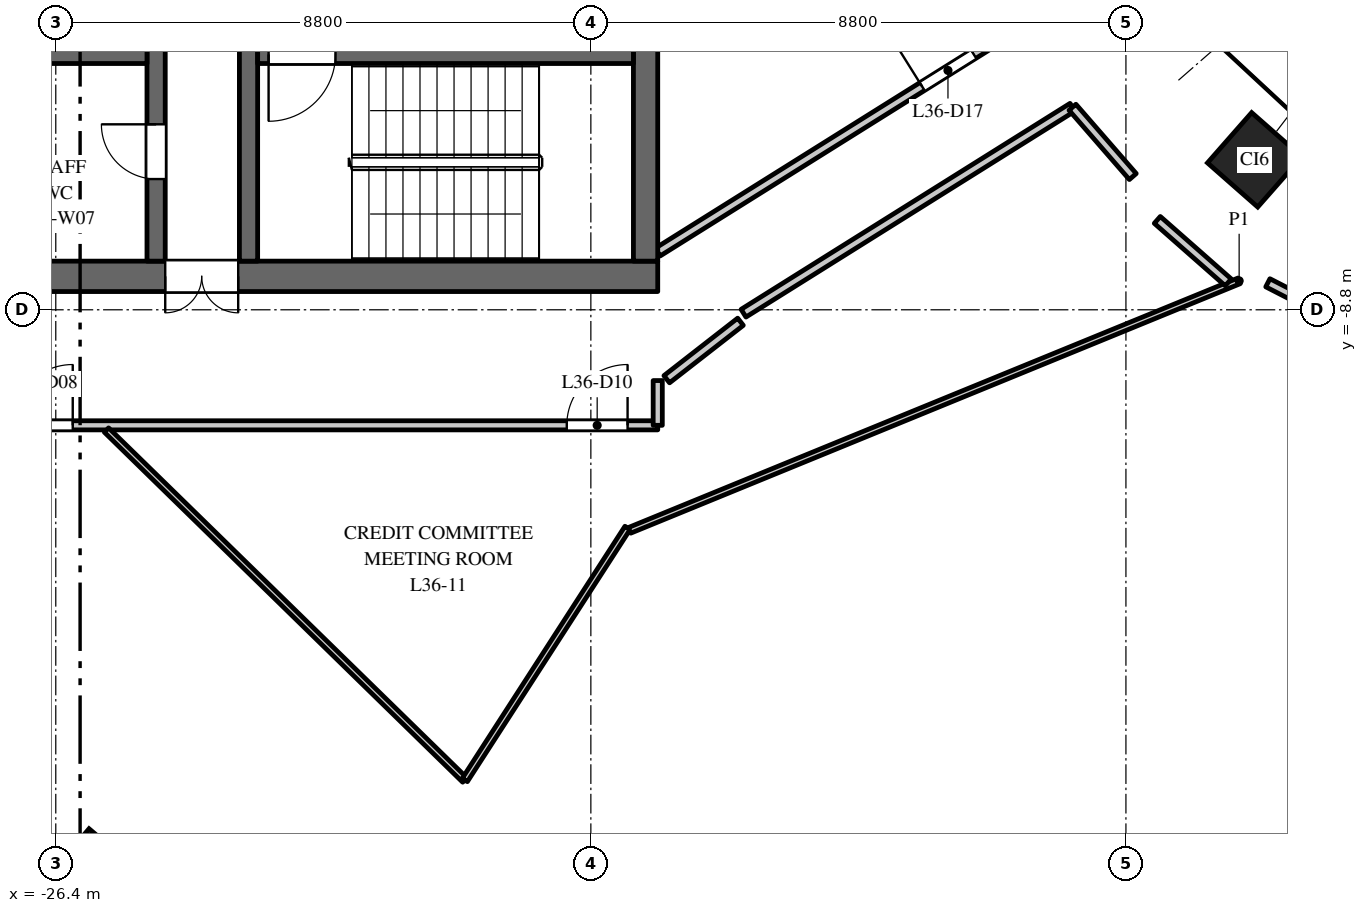
"""IFC4 building model, lengths in metres.
Left out: names, types, materials, properties, quantities, classifications, styles, units other than length and angle.
Written with IfcOpenShell. Run it as: python <this file> out.ifc"""

import sys

from ifc_helpers import new_model, si_unit, direction, frame, frame_2d, origin, origin_2d, place, context, subcontext, project, spatial, rectangle, extrude, element, fill, save


model = new_model("IFC4")
c1 = context("Model", 3, precision=1e-05, world=origin(), true_north=direction((0.0, 1.0)))
c2 = subcontext(c1, "Body", "Model", "MODEL_VIEW")
j1 = project(units=[si_unit("LENGTHUNIT", "METRE"), si_unit("PLANEANGLEUNIT", "RADIAN")], contexts=[c1])
p1 = place(None, origin())
s1 = spatial("IfcSite", under=j1, at=p1, CompositionType="ELEMENT")
p2 = place(p1, origin())
s2 = spatial("IfcBuilding", under=s1, at=p2, CompositionType="ELEMENT")
p3 = place(p2, frame((0.0, 0.0, 158.0)))
s3 = spatial("IfcBuildingStorey", under=s2, at=p3, CompositionType="ELEMENT", Elevation=158.0)
p4 = place(p3, frame((-25.783, -18.18, 0.0), z_axis=(0.0, 0.0, 1.0), x_axis=(0.763035199656, -0.646356932419, 0.0)))
e1 = element("IfcColumn", 1, at=p4, inside=s3, PredefinedType="COLUMN", context=c2, shape_type="SweptSolid", body=[
    extrude(rectangle(XDim=1.2, YDim=1.2, at=origin_2d()), origin(), (0.0, 0.0, 1.0), 4.0),
])
p5 = place(p3, frame((-6.682, -6.334, 0.0), z_axis=(0.0, 0.0, 1.0), x_axis=(0.75102249095, -0.660276622399, 0.0)))
e2 = element("IfcColumn", 2, at=p5, inside=s3, PredefinedType="COLUMN", context=c2, shape_type="SweptSolid", body=[
    extrude(rectangle(XDim=1.1, YDim=1.1, at=origin_2d()), origin(), (0.0, 0.0, 1.0), 4.0),
])
p6 = place(p3, frame((-16.5, -8.25, 0.0), z_axis=(0.0, 0.0, 1.0), x_axis=(-1.0, 0.0, 0.0)))
e3 = element("IfcWall", 3, at=p6, inside=s3, PredefinedType="SHEAR", context=c2, shape_type="SweptSolid", body=[
    extrude(rectangle(XDim=15.0, YDim=0.5, at=frame_2d((7.5, 0.0))), origin(), (0.0, 0.0, 1.0), 3.7),
])
p7 = place(p6, frame((6.9, 0.0, 0.0)))
e4 = element("IfcOpeningElement", 4, at=p7, cuts=e3, PredefinedType="OPENING", context=c2, shape_type="SweptSolid", body=[
    extrude(rectangle(XDim=1.2, YDim=2.1, at=frame_2d((0.6, 1.05))), frame((0.0, 0.26, 0.0), z_axis=(0.0, -1.0, 0.0), x_axis=(1.0, 0.0, 0.0)), (0.0, 0.0, 1.0), 0.52),
])
p8 = place(p6, frame((12.425, 0.0, 0.0)))
e5 = element("IfcOpeningElement", 5, at=p8, cuts=e3, PredefinedType="OPENING", context=c2, shape_type="SweptSolid", body=[
    extrude(rectangle(XDim=0.9, YDim=2.1, at=frame_2d((0.45, 1.05))), frame((0.0, 0.26, 0.0), z_axis=(0.0, -1.0, 0.0), x_axis=(1.0, 0.0, 0.0)), (0.0, 0.0, 1.0), 0.52),
])
p9 = place(p3, frame((-24.75, -8.0, 0.0), z_axis=(0.0, 0.0, 1.0), x_axis=(0.0, 1.0, 0.0)))
e6 = element("IfcWall", 6, at=p9, inside=s3, PredefinedType="SHEAR", context=c2, shape_type="SweptSolid", body=[
    extrude(rectangle(XDim=16.0, YDim=0.3, at=frame_2d((8.0, 0.0))), origin(), (0.0, 0.0, 1.0), 3.7),
])
p10 = place(p9, frame((4.425, 0.0, 0.0)))
e7 = element("IfcOpeningElement", 7, at=p10, cuts=e6, PredefinedType="OPENING", context=c2, shape_type="SweptSolid", body=[
    extrude(rectangle(XDim=1.1, YDim=2.1, at=frame_2d((0.55, 1.05))), frame((0.0, 0.16, 0.0), z_axis=(0.0, -1.0, 0.0), x_axis=(1.0, 0.0, 0.0)), (0.0, 0.0, 1.0), 0.32),
])
p11 = place(p9, frame((7.45, 0.0, 0.0)))
e8 = element("IfcOpeningElement", 8, at=p11, cuts=e6, PredefinedType="OPENING", context=c2, shape_type="SweptSolid", body=[
    extrude(rectangle(XDim=1.1, YDim=2.1, at=frame_2d((0.55, 1.05))), frame((0.0, 0.16, 0.0), z_axis=(0.0, -1.0, 0.0), x_axis=(1.0, 0.0, 0.0)), (0.0, 0.0, 1.0), 0.32),
])
p12 = place(p9, frame((10.475, 0.0, 0.0)))
e9 = element("IfcOpeningElement", 9, at=p12, cuts=e6, PredefinedType="OPENING", context=c2, shape_type="SweptSolid", body=[
    extrude(rectangle(XDim=1.1, YDim=2.1, at=frame_2d((0.55, 1.05))), frame((0.0, 0.16, 0.0), z_axis=(0.0, -1.0, 0.0), x_axis=(1.0, 0.0, 0.0)), (0.0, 0.0, 1.0), 0.32),
])
p13 = place(p9, frame((13.125, 0.0, 0.0)))
e10 = element("IfcOpeningElement", 10, at=p13, cuts=e6, PredefinedType="OPENING", context=c2, shape_type="SweptSolid", body=[
    extrude(rectangle(XDim=0.9, YDim=2.1, at=frame_2d((0.45, 1.05))), frame((0.0, 0.16, 0.0), z_axis=(0.0, -1.0, 0.0), x_axis=(1.0, 0.0, 0.0)), (0.0, 0.0, 1.0), 0.32),
])
p14 = place(p9, frame((14.75, 0.0, 0.0)))
e11 = element("IfcOpeningElement", 11, at=p14, cuts=e6, PredefinedType="OPENING", context=c2, shape_type="SweptSolid", body=[
    extrude(rectangle(XDim=0.9, YDim=2.1, at=frame_2d((0.45, 1.05))), frame((0.0, 0.16, 0.0), z_axis=(0.0, -1.0, 0.0), x_axis=(1.0, 0.0, 0.0)), (0.0, 0.0, 1.0), 0.32),
])
p15 = place(p9, frame((1.35, 0.0, 0.0)))
e12 = element("IfcOpeningElement", 12, at=p15, cuts=e6, PredefinedType="OPENING", context=c2, shape_type="SweptSolid", body=[
    extrude(rectangle(XDim=0.9, YDim=2.1, at=frame_2d((0.45, 1.05))), frame((0.0, 0.16, 0.0), z_axis=(0.0, -1.0, 0.0), x_axis=(1.0, 0.0, 0.0)), (0.0, 0.0, 1.0), 0.32),
])
p16 = place(p3, frame((-16.7, -8.0, 0.0), z_axis=(0.0, 0.0, 1.0), x_axis=(0.0, 1.0, 0.0)))
e13 = element("IfcWall", 13, at=p16, inside=s3, PredefinedType="SHEAR", context=c2, shape_type="SweptSolid", body=[
    extrude(rectangle(XDim=16.0, YDim=0.4, at=frame_2d((8.0, 0.0))), origin(), (0.0, 0.0, 1.0), 3.7),
])
p17 = place(p3, frame((-24.9, -4.6, 0.0), z_axis=(0.0, 0.0, 1.0), x_axis=(-1.0, 0.0, 0.0)))
e14 = element("IfcWall", 14, at=p17, inside=s3, PredefinedType="SHEAR", context=c2, shape_type="SweptSolid", body=[
    extrude(rectangle(XDim=6.1, YDim=0.3, at=frame_2d((3.05, 0.0))), origin(), (0.0, 0.0, 1.0), 3.7),
])
p18 = place(p3, frame((-23.23, -8.0, 0.0), z_axis=(0.0, 0.0, 1.0), x_axis=(0.0, 1.0, 0.0)))
e15 = element("IfcWall", 15, at=p18, inside=s3, PredefinedType="SHEAR", context=c2, shape_type="SweptSolid", body=[
    extrude(rectangle(XDim=7.875, YDim=0.3, at=frame_2d((3.938, 0.0))), origin(), (0.0, 0.0, 1.0), 3.7),
])
p19 = place(p18, frame((5.15, 0.0, 0.0)))
e16 = element("IfcOpeningElement", 16, at=p19, cuts=e15, PredefinedType="OPENING", context=c2, shape_type="SweptSolid", body=[
    extrude(rectangle(XDim=1.1, YDim=2.1, at=frame_2d((0.55, 1.05))), frame((0.0, 0.16, 0.0), z_axis=(0.0, -1.0, 0.0), x_axis=(1.0, 0.0, 0.0)), (0.0, 0.0, 1.0), 0.32),
])
p20 = place(p3, frame((-16.9, -4.6, 0.0), z_axis=(0.0, 0.0, 1.0), x_axis=(-1.0, 0.0, 0.0)))
e17 = element("IfcWall", 17, at=p20, inside=s3, PredefinedType="SHEAR", context=c2, shape_type="SweptSolid", body=[
    extrude(rectangle(XDim=6.18, YDim=0.3, at=frame_2d((3.09, 0.0))), origin(), (0.0, 0.0, 1.0), 3.7),
])
p21 = place(p20, frame((4.9, 0.0, 0.0)))
e18 = element("IfcOpeningElement", 18, at=p21, cuts=e17, PredefinedType="OPENING", context=c2, shape_type="SweptSolid", body=[
    extrude(rectangle(XDim=1.1, YDim=2.1, at=frame_2d((0.55, 1.05))), frame((0.0, 0.16, 0.0), z_axis=(0.0, -1.0, 0.0), x_axis=(1.0, 0.0, 0.0)), (0.0, 0.0, 1.0), 0.32),
])
p22 = place(p3, frame((-31.5, -10.7, 0.0), z_axis=(0.0, 0.0, 1.0), x_axis=(1.0, 0.0, 0.0)))
e19 = element("IfcWall", 19, at=p22, inside=s3, PredefinedType="PARTITIONING", context=c2, shape_type="SweptSolid", body=[
    extrude(rectangle(XDim=15.0, YDim=0.15, at=frame_2d((7.5, 0.0))), origin(), (0.0, 0.0, 1.0), 3.1),
])
p23 = place(p22, frame((4.379, 0.0, 0.0)))
e20 = element("IfcOpeningElement", 20, at=p23, cuts=e19, PredefinedType="OPENING", context=c2, shape_type="SweptSolid", body=[
    extrude(rectangle(XDim=1.0, YDim=2.1, at=frame_2d((0.5, 1.05))), frame((0.0, 0.085, 0.0), z_axis=(0.0, -1.0, 0.0), x_axis=(1.0, 0.0, 0.0)), (0.0, 0.0, 1.0), 0.17),
])
p24 = place(p22, frame((13.504, 0.0, 0.0)))
e21 = element("IfcOpeningElement", 21, at=p24, cuts=e19, PredefinedType="OPENING", context=c2, shape_type="SweptSolid", body=[
    extrude(rectangle(XDim=1.0, YDim=2.1, at=frame_2d((0.5, 1.05))), frame((0.0, 0.085, 0.0), z_axis=(0.0, -1.0, 0.0), x_axis=(1.0, 0.0, 0.0)), (0.0, 0.0, 1.0), 0.17),
])
p25 = place(p3, frame((-25.566, -10.778, 0.0), z_axis=(0.0, 0.0, 1.0), x_axis=(0.715430617602, -0.698683784982, 0.0)))
e22 = element("IfcWall", 22, at=p25, inside=s3, PredefinedType="PARTITIONING", context=c2, shape_type="SweptSolid", body=[
    extrude(rectangle(XDim=8.237, YDim=0.1, at=frame_2d((4.118, 0.0))), origin(), (0.0, 0.0, 1.0), 2.75),
])
p26 = place(p3, frame((-19.673, -16.533, 0.0), z_axis=(0.0, 0.0, 1.0), x_axis=(0.542297022656, 0.840186847801, 0.0)))
e23 = element("IfcWall", 23, at=p26, inside=s3, PredefinedType="PARTITIONING", context=c2, shape_type="SweptSolid", body=[
    extrude(rectangle(XDim=4.935, YDim=0.1, at=frame_2d((2.467, 0.0))), origin(), (0.0, 0.0, 1.0), 3.7),
])
p27 = place(p3, frame((-16.963, -12.427, 0.0), z_axis=(0.0, 0.0, 1.0), x_axis=(0.925484473487, 0.378785545308, 0.0)))
e24 = element("IfcWall", 24, at=p27, inside=s3, PredefinedType="PARTITIONING", context=c2, shape_type="SweptSolid", body=[
    extrude(rectangle(XDim=10.832, YDim=0.1, at=frame_2d((5.416, 0.0))), origin(), (0.0, 0.0, 1.0), 3.7),
])
p28 = place(p3, frame((-16.5, -10.7, 0.0), z_axis=(0.0, 0.0, 1.0), x_axis=(0.0, 1.0, 0.0)))
e25 = element("IfcWall", 25, at=p28, inside=s3, PredefinedType="PARTITIONING", context=c2, shape_type="SweptSolid", body=[
    extrude(rectangle(XDim=0.736, YDim=0.15, at=frame_2d((0.368, 0.0))), origin(), (0.0, 0.0, 1.0), 3.7),
])
p29 = place(p3, frame((-16.5, -7.851, 0.0), z_axis=(0.0, 0.0, 1.0), x_axis=(0.847690706888, 0.530490777917, 0.0)))
e26 = element("IfcWall", 26, at=p29, inside=s3, PredefinedType="PARTITIONING", context=c2, shape_type="SweptSolid", body=[
    extrude(rectangle(XDim=6.781, YDim=0.15, at=frame_2d((3.39, 0.0))), origin(), (0.0, 0.0, 1.0), 3.7),
])
p30 = place(p29, frame((5.131, 0.0, 0.0)))
e27 = element("IfcOpeningElement", 27, at=p30, cuts=e26, PredefinedType="OPENING", context=c2, shape_type="SweptSolid", body=[
    extrude(rectangle(XDim=1.0, YDim=2.1, at=frame_2d((0.5, 1.05))), frame((0.0, 0.085, 0.0), z_axis=(0.0, -1.0, 0.0), x_axis=(1.0, 0.0, 0.0)), (0.0, 0.0, 1.0), 0.17),
])
p31 = place(p3, frame((-15.089, -8.856, 0.0), z_axis=(0.0, 0.0, 1.0), x_axis=(0.847602682855, 0.530631408811, 0.0)))
e28 = element("IfcWall", 28, at=p31, inside=s3, PredefinedType="PARTITIONING", context=c2, shape_type="SweptSolid", body=[
    extrude(rectangle(XDim=6.383, YDim=0.15, at=frame_2d((3.191, 0.0))), origin(), (0.0, 0.0, 1.0), 3.7),
])
p32 = place(p3, frame((-9.679, -5.469, 0.0), z_axis=(0.0, 0.0, 1.0), x_axis=(0.656454677423, -0.75436546613, 0.0)))
e29 = element("IfcWall", 29, at=p32, inside=s3, PredefinedType="PARTITIONING", context=c2, shape_type="SweptSolid", body=[
    extrude(rectangle(XDim=1.511, YDim=0.15, at=frame_2d((0.755, 0.0))), origin(), (0.0, 0.0, 1.0), 2.75),
])
p33 = place(p3, frame((-8.284, -7.322, 0.0), z_axis=(0.0, 0.0, 1.0), x_axis=(0.750666784408, -0.660680996235, 0.0)))
e30 = element("IfcWall", 30, at=p33, inside=s3, PredefinedType="PARTITIONING", context=c2, shape_type="SweptSolid", body=[
    extrude(rectangle(XDim=1.555, YDim=0.15, at=frame_2d((0.777, 0.0))), origin(), (0.0, 0.0, 1.0), 3.7),
])
p34 = place(p3, frame((-6.466, -8.356, 0.0), z_axis=(0.0, 0.0, 1.0), x_axis=(0.889472002788, -0.456989667559, 0.0)))
e31 = element("IfcWall", 31, at=p34, inside=s3, PredefinedType="PARTITIONING", context=c2, shape_type="SweptSolid", body=[
    extrude(rectangle(XDim=1.355, YDim=0.15, at=frame_2d((0.677, 0.0))), origin(), (0.0, 0.0, 1.0), 3.7),
])
p35 = place(p3, frame((-15.139, -8.997, 0.0), z_axis=(0.0, 0.0, 1.0), x_axis=(-0.788950226826, -0.614457109643, 0.0)))
e32 = element("IfcWall", 32, at=p35, inside=s3, PredefinedType="PARTITIONING", context=c2, shape_type="SweptSolid", body=[
    extrude(rectangle(XDim=1.538, YDim=0.15, at=frame_2d((0.769, 0.0))), origin(), (0.0, 0.0, 1.0), 3.7),
])
p36 = place(p21, origin())
e33 = element("IfcDoor", 33, at=p36, inside=s3, OperationType="SINGLE_SWING_LEFT", PredefinedType="DOOR", context=c2, shape_type="SweptSolid", body=[
    extrude(rectangle(XDim=1.1, YDim=2.1, at=frame_2d((0.55, 1.05))), frame((0.0, 0.025, 0.0), z_axis=(0.0, -1.0, 0.0), x_axis=(1.0, 0.0, 0.0)), (0.0, 0.0, 1.0), 0.05),
])
fill(e18, e33)
p37 = place(p7, origin())
e34 = element("IfcDoor", 34, at=p37, inside=s3, OperationType="DOUBLE_DOOR_DOUBLE_SWING", PredefinedType="DOOR", context=c2, shape_type="SweptSolid", body=[
    extrude(rectangle(XDim=1.2, YDim=2.1, at=frame_2d((0.6, 1.05))), frame((0.0, 0.025, 0.0), z_axis=(0.0, -1.0, 0.0), x_axis=(1.0, 0.0, 0.0)), (0.0, 0.0, 1.0), 0.05),
])
fill(e4, e34)
p38 = place(p15, origin())
e35 = element("IfcDoor", 35, at=p38, inside=s3, OperationType="SINGLE_SWING_LEFT", PredefinedType="DOOR", context=c2, shape_type="SweptSolid", body=[
    extrude(rectangle(XDim=0.9, YDim=2.1, at=frame_2d((0.45, 1.05))), frame((0.0, 0.025, 0.0), z_axis=(0.0, -1.0, 0.0), x_axis=(1.0, 0.0, 0.0)), (0.0, 0.0, 1.0), 0.05),
])
fill(e12, e35)
p39 = place(p23, origin())
e36 = element("IfcDoor", 36, at=p39, inside=s3, OperationType="SINGLE_SWING_RIGHT", PredefinedType="DOOR", context=c2, shape_type="SweptSolid", body=[
    extrude(rectangle(XDim=1.0, YDim=2.1, at=frame_2d((0.5, 1.05))), frame((0.0, 0.025, 0.0), z_axis=(0.0, -1.0, 0.0), x_axis=(1.0, 0.0, 0.0)), (0.0, 0.0, 1.0), 0.05),
])
fill(e20, e36)
p40 = place(p24, origin())
e37 = element("IfcDoor", 37, at=p40, inside=s3, OperationType="SINGLE_SWING_RIGHT", PredefinedType="DOOR", context=c2, shape_type="SweptSolid", body=[
    extrude(rectangle(XDim=1.0, YDim=2.1, at=frame_2d((0.5, 1.05))), frame((0.0, 0.025, 0.0), z_axis=(0.0, -1.0, 0.0), x_axis=(1.0, 0.0, 0.0)), (0.0, 0.0, 1.0), 0.05),
])
fill(e21, e37)
p41 = place(p30, origin())
e38 = element("IfcDoor", 38, at=p41, inside=s3, OperationType="SINGLE_SWING_LEFT", PredefinedType="DOOR", context=c2, shape_type="SweptSolid", body=[
    extrude(rectangle(XDim=1.0, YDim=2.1, at=frame_2d((0.5, 1.05))), frame((0.0, 0.025, 0.0), z_axis=(0.0, -1.0, 0.0), x_axis=(1.0, 0.0, 0.0)), (0.0, 0.0, 1.0), 0.05),
])
fill(e27, e38)
save(model, sys.argv[1])
